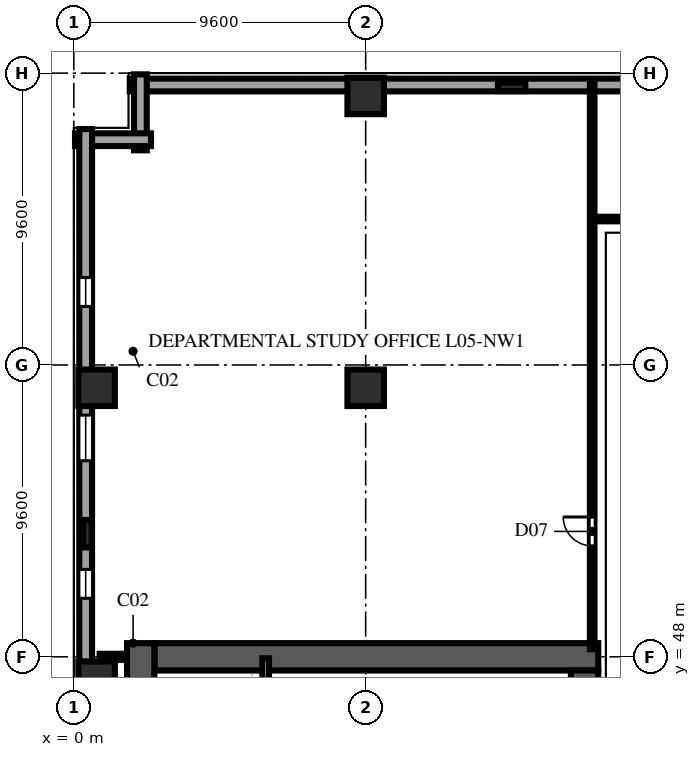
"""IFC4 building model, lengths in metres.
Left out: names, types, materials, properties, quantities, classifications, styles, units other than length and angle.
Written with IfcOpenShell. Run it as: python <this file> out.ifc"""

import sys

from ifc_helpers import new_model, si_unit, direction, frame, frame_2d, origin, origin_2d, place, context, subcontext, project, spatial, rectangle, extrude, element, fill, save


model = new_model("IFC4")
c1 = context("Model", 3, precision=1e-05, world=origin(), true_north=direction((0.0, 1.0)))
c2 = subcontext(c1, "Body", "Model", "MODEL_VIEW")
j1 = project(units=[si_unit("LENGTHUNIT", "METRE"), si_unit("PLANEANGLEUNIT", "RADIAN")], contexts=[c1])
p1 = place(None, origin())
s1 = spatial("IfcSite", under=j1, at=p1, CompositionType="ELEMENT")
p2 = place(p1, origin())
s2 = spatial("IfcBuilding", under=s1, at=p2, CompositionType="ELEMENT")
p3 = place(p2, frame((0.0, 0.0, 24.2)))
s3 = spatial("IfcBuildingStorey", under=s2, at=p3, CompositionType="ELEMENT", Elevation=24.2)
p4 = place(p3, frame((2.65, 48.0, 0.0), z_axis=(0.0, 0.0, 1.0), x_axis=(1.0, 0.0, 0.0)))
e1 = element("IfcWall", 1, at=p4, inside=s3, PredefinedType="SHEAR", context=c2, shape_type="SweptSolid", body=[
    extrude(rectangle(XDim=14.6, YDim=0.9, at=frame_2d((7.3, 0.0))), origin(), (0.0, 0.0, 1.0), 3.54),
])
p5 = place(p3, frame((2.2, 9.15, 0.0), z_axis=(0.0, 0.0, 1.0), x_axis=(0.0, 1.0, 0.0)))
e2 = element("IfcWall", 2, at=p5, inside=s3, PredefinedType="SHEAR", context=c2, shape_type="SweptSolid", body=[
    extrude(rectangle(XDim=39.3, YDim=0.9, at=frame_2d((19.65, 0.0))), origin(), (0.0, 0.0, 1.0), 3.54),
])
p6 = place(p3, frame((16.8, 36.4, 0.0), z_axis=(0.0, 0.0, 1.0), x_axis=(0.0, 1.0, 0.0)))
e3 = element("IfcWall", 3, at=p6, inside=s3, PredefinedType="SHEAR", context=c2, shape_type="SweptSolid", body=[
    extrude(rectangle(XDim=11.15, YDim=0.9, at=frame_2d((5.575, 0.0))), origin(), (0.0, 0.0, 1.0), 3.54),
])
p7 = place(p6, frame((9.2, 0.0, 0.0)))
e4 = element("IfcOpeningElement", 4, at=p7, cuts=e3, PredefinedType="OPENING", context=c2, shape_type="SweptSolid", body=[
    extrude(rectangle(XDim=0.95, YDim=2.15, at=frame_2d((0.475, 1.075))), frame((0.0, 0.462, 0.0), z_axis=(0.0, -1.0, 0.0), x_axis=(1.0, 0.0, 0.0)), (0.0, 0.0, 1.0), 0.924),
])
for number, where, z_axis, x_axis in (
    (5, (0.75, 47.25, 0.0), (0.0, 0.0, 1.0), (1.0, 0.0, 0.0)),
    (6, (0.75, 56.85, 0.0), (0.0, 0.0, 1.0), (1.0, 0.0, 0.0)),
    (7, (9.6, 56.85, 0.0), (0.0, 0.0, 1.0), (1.0, 0.0, 0.0)),
    (8, (9.6, 66.45, 0.0), (0.0, 0.0, 1.0), (1.0, 0.0, 0.0)),
):
    element("IfcColumn", number, at=place(p3, frame(where, z_axis=z_axis, x_axis=x_axis)), inside=s3, PredefinedType="COLUMN", context=c2, shape_type="SweptSolid", body=[
        extrude(rectangle(XDim=1.2, YDim=1.2, at=origin_2d()), origin(), (0.0, 0.0, 1.0), 3.8),
    ])
for number, where, z_axis, x_axis in (
    (9, (0.45, 52.05, 0.0), (0.0, 0.0, 1.0), (0.0, 1.0, 0.0)),
    (10, (14.4, 66.75, 0.0), (0.0, 0.0, 1.0), (1.0, 0.0, 0.0)),
):
    element("IfcColumn", number, at=place(p3, frame(where, z_axis=z_axis, x_axis=x_axis)), inside=s3, PredefinedType="PILASTER", context=c2, shape_type="SweptSolid", body=[
        extrude(rectangle(XDim=0.9, YDim=0.28, at=origin_2d()), origin(), (0.0, 0.0, 1.0), 3.8),
    ])
p8 = place(p3, frame((36.56, 66.81, 0.0), z_axis=(0.0, 0.0, 1.0), x_axis=(-1.0, 0.0, 0.0)))
e11 = element("IfcWall", 11, at=p8, inside=s3, PredefinedType="SOLIDWALL", context=c2, shape_type="SweptSolid", body=[
    extrude(rectangle(XDim=34.72, YDim=0.42, at=frame_2d((17.36, 0.0))), origin(), (0.0, 0.0, 1.0), 3.54),
])
p9 = place(p8, frame((4.885, 0.0, 0.9)))
e12 = element("IfcOpeningElement", 12, at=p9, cuts=e11, PredefinedType="OPENING", context=c2, shape_type="SweptSolid", body=[
    extrude(rectangle(XDim=0.95, YDim=1.85, at=frame_2d((0.475, 0.925))), frame((0.0, 0.222, 0.0), z_axis=(0.0, -1.0, 0.0), x_axis=(1.0, 0.0, 0.0)), (0.0, 0.0, 1.0), 0.444),
])
p10 = place(p8, frame((9.41, 0.0, 0.9)))
e13 = element("IfcOpeningElement", 13, at=p10, cuts=e11, PredefinedType="OPENING", context=c2, shape_type="SweptSolid", body=[
    extrude(rectangle(XDim=1.5, YDim=1.85, at=frame_2d((0.75, 0.925))), frame((0.0, 0.222, 0.0), z_axis=(0.0, -1.0, 0.0), x_axis=(1.0, 0.0, 0.0)), (0.0, 0.0, 1.0), 0.444),
])
p11 = place(p8, frame((14.485, 0.0, 0.9)))
e14 = element("IfcOpeningElement", 14, at=p11, cuts=e11, PredefinedType="OPENING", context=c2, shape_type="SweptSolid", body=[
    extrude(rectangle(XDim=0.95, YDim=1.85, at=frame_2d((0.475, 0.925))), frame((0.0, 0.222, 0.0), z_axis=(0.0, -1.0, 0.0), x_axis=(1.0, 0.0, 0.0)), (0.0, 0.0, 1.0), 0.444),
])
for number, where, z_axis, x_axis in (
    (15, (2.19, 67.16, 0.0), (0.0, 0.0, 1.0), (0.0, -1.0, 0.0)),
    (16, (2.54, 65.01, 0.0), (0.0, 0.0, 1.0), (-1.0, 0.0, 0.0)),
):
    element("IfcWall", number, at=place(p3, frame(where, z_axis=z_axis, x_axis=x_axis)), inside=s3, PredefinedType="SOLIDWALL", context=c2, shape_type="SweptSolid", body=[
        extrude(rectangle(XDim=2.5, YDim=0.42, at=frame_2d((1.25, 0.0))), origin(), (0.0, 0.0, 1.0), 3.54),
    ])
p12 = place(p3, frame((0.39, 65.36, 0.0), z_axis=(0.0, 0.0, 1.0), x_axis=(0.0, -1.0, 0.0)))
e17 = element("IfcWall", 17, at=p12, inside=s3, PredefinedType="SOLIDWALL", context=c2, shape_type="SweptSolid", body=[
    extrude(rectangle(XDim=63.52, YDim=0.42, at=frame_2d((31.76, 0.0))), origin(), (0.0, 0.0, 1.0), 3.54),
])
p13 = place(p12, frame((4.885, 0.0, 0.9)))
e18 = element("IfcOpeningElement", 18, at=p13, cuts=e17, PredefinedType="OPENING", context=c2, shape_type="SweptSolid", body=[
    extrude(rectangle(XDim=0.95, YDim=1.85, at=frame_2d((0.475, 0.925))), frame((0.0, 0.222, 0.0), z_axis=(0.0, -1.0, 0.0), x_axis=(1.0, 0.0, 0.0)), (0.0, 0.0, 1.0), 0.444),
])
p14 = place(p12, frame((9.41, 0.0, 0.9)))
e19 = element("IfcOpeningElement", 19, at=p14, cuts=e17, PredefinedType="OPENING", context=c2, shape_type="SweptSolid", body=[
    extrude(rectangle(XDim=1.5, YDim=1.85, at=frame_2d((0.75, 0.925))), frame((0.0, 0.222, 0.0), z_axis=(0.0, -1.0, 0.0), x_axis=(1.0, 0.0, 0.0)), (0.0, 0.0, 1.0), 0.444),
])
p15 = place(p12, frame((14.485, 0.0, 0.9)))
e20 = element("IfcOpeningElement", 20, at=p15, cuts=e17, PredefinedType="OPENING", context=c2, shape_type="SweptSolid", body=[
    extrude(rectangle(XDim=0.95, YDim=1.85, at=frame_2d((0.475, 0.925))), frame((0.0, 0.222, 0.0), z_axis=(0.0, -1.0, 0.0), x_axis=(1.0, 0.0, 0.0)), (0.0, 0.0, 1.0), 0.444),
])
p16 = place(p12, frame((19.01, 0.0, 0.9)))
e21 = element("IfcOpeningElement", 21, at=p16, cuts=e17, PredefinedType="OPENING", context=c2, shape_type="SweptSolid", body=[
    extrude(rectangle(XDim=1.5, YDim=1.85, at=frame_2d((0.75, 0.925))), frame((0.0, 0.222, 0.0), z_axis=(0.0, -1.0, 0.0), x_axis=(1.0, 0.0, 0.0)), (0.0, 0.0, 1.0), 0.444),
])
p17 = place(p12, frame((24.085, 0.0, 0.9)))
e22 = element("IfcOpeningElement", 22, at=p17, cuts=e17, PredefinedType="OPENING", context=c2, shape_type="SweptSolid", body=[
    extrude(rectangle(XDim=0.95, YDim=1.85, at=frame_2d((0.475, 0.925))), frame((0.0, 0.222, 0.0), z_axis=(0.0, -1.0, 0.0), x_axis=(1.0, 0.0, 0.0)), (0.0, 0.0, 1.0), 0.444),
])
p18 = place(p12, frame((28.61, 0.0, 0.9)))
e23 = element("IfcOpeningElement", 23, at=p18, cuts=e17, PredefinedType="OPENING", context=c2, shape_type="SweptSolid", body=[
    extrude(rectangle(XDim=1.5, YDim=1.85, at=frame_2d((0.75, 0.925))), frame((0.0, 0.222, 0.0), z_axis=(0.0, -1.0, 0.0), x_axis=(1.0, 0.0, 0.0)), (0.0, 0.0, 1.0), 0.444),
])
p19 = place(p12, frame((33.685, 0.0, 0.9)))
e24 = element("IfcOpeningElement", 24, at=p19, cuts=e17, PredefinedType="OPENING", context=c2, shape_type="SweptSolid", body=[
    extrude(rectangle(XDim=0.95, YDim=1.85, at=frame_2d((0.475, 0.925))), frame((0.0, 0.222, 0.0), z_axis=(0.0, -1.0, 0.0), x_axis=(1.0, 0.0, 0.0)), (0.0, 0.0, 1.0), 0.444),
])
p20 = place(p12, frame((38.21, 0.0, 0.9)))
e25 = element("IfcOpeningElement", 25, at=p20, cuts=e17, PredefinedType="OPENING", context=c2, shape_type="SweptSolid", body=[
    extrude(rectangle(XDim=1.5, YDim=1.85, at=frame_2d((0.75, 0.925))), frame((0.0, 0.222, 0.0), z_axis=(0.0, -1.0, 0.0), x_axis=(1.0, 0.0, 0.0)), (0.0, 0.0, 1.0), 0.444),
])
p21 = place(p12, frame((43.285, 0.0, 0.9)))
e26 = element("IfcOpeningElement", 26, at=p21, cuts=e17, PredefinedType="OPENING", context=c2, shape_type="SweptSolid", body=[
    extrude(rectangle(XDim=0.95, YDim=1.85, at=frame_2d((0.475, 0.925))), frame((0.0, 0.222, 0.0), z_axis=(0.0, -1.0, 0.0), x_axis=(1.0, 0.0, 0.0)), (0.0, 0.0, 1.0), 0.444),
])
p22 = place(p12, frame((47.81, 0.0, 0.9)))
e27 = element("IfcOpeningElement", 27, at=p22, cuts=e17, PredefinedType="OPENING", context=c2, shape_type="SweptSolid", body=[
    extrude(rectangle(XDim=1.5, YDim=1.85, at=frame_2d((0.75, 0.925))), frame((0.0, 0.222, 0.0), z_axis=(0.0, -1.0, 0.0), x_axis=(1.0, 0.0, 0.0)), (0.0, 0.0, 1.0), 0.444),
])
p23 = place(p12, frame((52.885, 0.0, 0.9)))
e28 = element("IfcOpeningElement", 28, at=p23, cuts=e17, PredefinedType="OPENING", context=c2, shape_type="SweptSolid", body=[
    extrude(rectangle(XDim=0.95, YDim=1.85, at=frame_2d((0.475, 0.925))), frame((0.0, 0.222, 0.0), z_axis=(0.0, -1.0, 0.0), x_axis=(1.0, 0.0, 0.0)), (0.0, 0.0, 1.0), 0.444),
])
p24 = place(p3, frame((6.31, 40.14, 0.0), z_axis=(0.0, 0.0, 1.0), x_axis=(0.0, 1.0, 0.0)))
e29 = element("IfcWall", 29, at=p24, inside=s3, PredefinedType="SOLIDWALL", context=c2, shape_type="SweptSolid", body=[
    extrude(rectangle(XDim=7.81, YDim=0.22, at=frame_2d((3.905, 0.0))), origin(), (0.0, 0.0, 1.0), 3.54),
])
p25 = place(p3, frame((0.85, 48.0, 0.0), z_axis=(0.0, 0.0, 1.0), x_axis=(1.0, 0.0, 0.0)))
e30 = element("IfcWall", 30, at=p25, inside=s3, PredefinedType="SOLIDWALL", context=c2, shape_type="SweptSolid", body=[
    extrude(rectangle(XDim=0.895, YDim=0.2, at=frame_2d((0.448, 0.0))), origin(), (0.0, 0.0, 1.0), 3.54),
])
p26 = place(p3, frame((17.05, 62.4, 0.0), z_axis=(0.0, 0.0, 1.0), x_axis=(1.0, 0.0, 0.0)))
e31 = element("IfcWall", 31, at=p26, inside=s3, PredefinedType="PARTITIONING", context=c2, shape_type="SweptSolid", body=[
    extrude(rectangle(XDim=2.15, YDim=0.15, at=frame_2d((1.075, 0.0))), origin(), (0.0, 0.0, 1.0), 3.54),
])
p27 = place(p3, frame((17.05, 48.25, 0.0), z_axis=(0.0, 0.0, 1.0), x_axis=(0.0, 1.0, 0.0)))
e32 = element("IfcWall", 32, at=p27, inside=s3, PredefinedType="PARTITIONING", context=c2, shape_type="SweptSolid", body=[
    extrude(rectangle(XDim=18.73, YDim=0.15, at=frame_2d((9.365, 0.0))), origin(), (0.0, 0.0, 1.0), 3.54),
])
p28 = place(p27, frame((3.4, 0.0, 0.0)))
e33 = element("IfcOpeningElement", 33, at=p28, cuts=e32, PredefinedType="OPENING", context=c2, shape_type="SweptSolid", body=[
    extrude(rectangle(XDim=0.95, YDim=2.15, at=frame_2d((0.475, 1.075))), frame((0.0, 0.087, 0.0), z_axis=(0.0, -1.0, 0.0), x_axis=(1.0, 0.0, 0.0)), (0.0, 0.0, 1.0), 0.174),
])
p29 = place(p13, origin())
e34 = element("IfcWindow", 34, at=p29, inside=s3, PartitioningType="SINGLE_PANEL", PredefinedType="WINDOW", context=c2, shape_type="SweptSolid", body=[
    extrude(rectangle(XDim=0.95, YDim=1.85, at=frame_2d((0.475, 0.925))), frame((0.0, 0.11, 0.0), z_axis=(0.0, -1.0, 0.0), x_axis=(1.0, 0.0, 0.0)), (0.0, 0.0, 1.0), 0.06),
])
fill(e18, e34)
p30 = place(p14, origin())
e35 = element("IfcWindow", 35, at=p30, inside=s3, PartitioningType="DOUBLE_PANEL_VERTICAL", PredefinedType="WINDOW", context=c2, shape_type="SweptSolid", body=[
    extrude(rectangle(XDim=1.5, YDim=1.85, at=frame_2d((0.75, 0.925))), frame((0.0, 0.11, 0.0), z_axis=(0.0, -1.0, 0.0), x_axis=(1.0, 0.0, 0.0)), (0.0, 0.0, 1.0), 0.06),
])
fill(e19, e35)
p31 = place(p15, origin())
e36 = element("IfcWindow", 36, at=p31, inside=s3, PartitioningType="SINGLE_PANEL", PredefinedType="WINDOW", context=c2, shape_type="SweptSolid", body=[
    extrude(rectangle(XDim=0.95, YDim=1.85, at=frame_2d((0.475, 0.925))), frame((0.0, 0.11, 0.0), z_axis=(0.0, -1.0, 0.0), x_axis=(1.0, 0.0, 0.0)), (0.0, 0.0, 1.0), 0.06),
])
fill(e20, e36)
p32 = place(p28, origin())
e37 = element("IfcDoor", 37, at=p32, inside=s3, OperationType="SINGLE_SWING_RIGHT", PredefinedType="DOOR", context=c2, shape_type="SweptSolid", body=[
    extrude(rectangle(XDim=0.95, YDim=2.15, at=frame_2d((0.475, 1.075))), frame((0.0, 0.025, 0.0), z_axis=(0.0, -1.0, 0.0), x_axis=(1.0, 0.0, 0.0)), (0.0, 0.0, 1.0), 0.05),
])
fill(e33, e37)
save(model, sys.argv[1])
